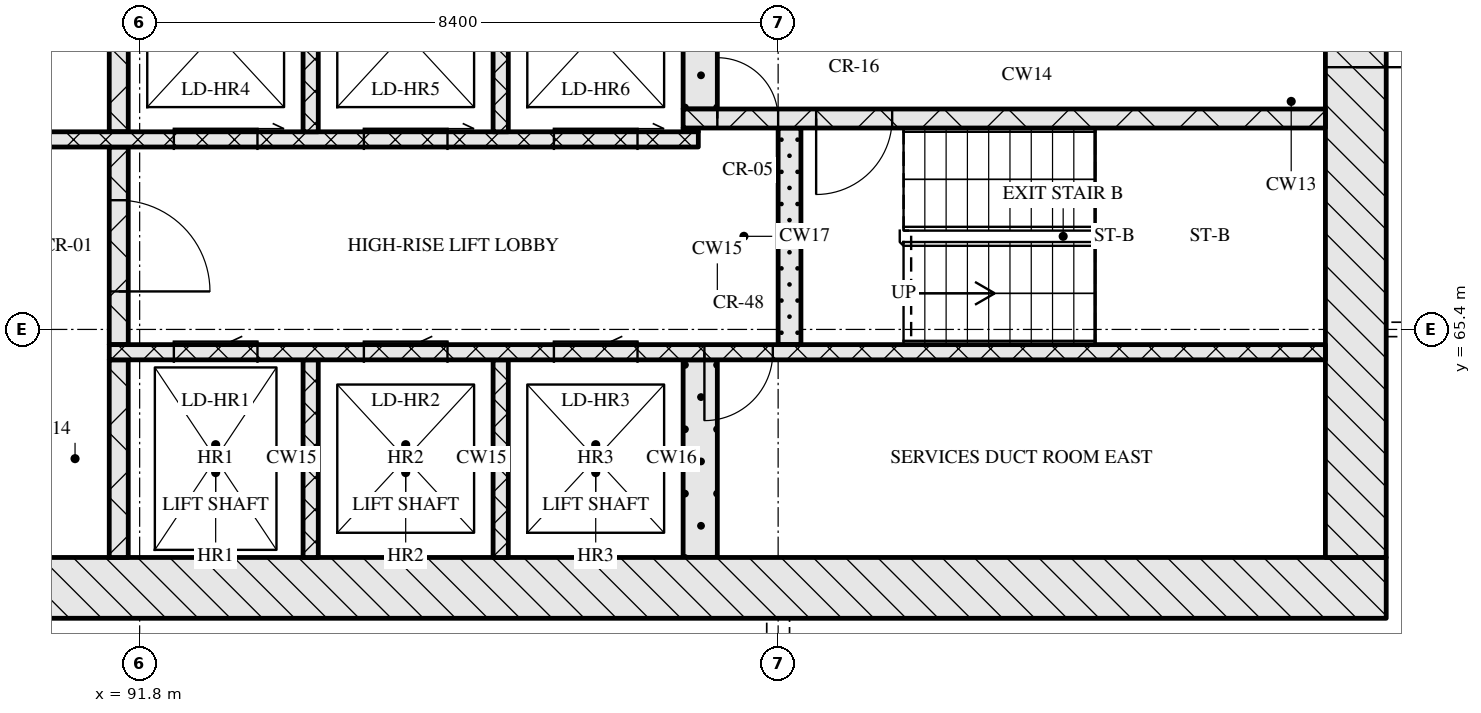
"""IFC4 building model, lengths in metres.
Left out: names, types, materials, properties, quantities, classifications, styles, units other than length and angle.
Written with IfcOpenShell. Run it as: python <this file> out.ifc"""

import sys

from ifc_helpers import new_model, si_unit, direction, frame, frame_2d, origin, place, context, subcontext, project, spatial, rectangle, extrude, element, fill, save


model = new_model("IFC4")
c1 = context("Model", 3, precision=1e-05, world=origin(), true_north=direction((0.0, 1.0)))
c2 = subcontext(c1, "Body", "Model", "MODEL_VIEW")
j1 = project(units=[si_unit("LENGTHUNIT", "METRE"), si_unit("PLANEANGLEUNIT", "RADIAN")], contexts=[c1])
p1 = place(None, origin())
s1 = spatial("IfcSite", under=j1, at=p1, CompositionType="ELEMENT")
p2 = place(p1, origin())
s2 = spatial("IfcBuilding", under=s1, at=p2, CompositionType="ELEMENT")
p3 = place(p2, frame((0.0, 0.0, 172.65)))
s3 = spatial("IfcBuildingStorey", under=s2, at=p3, CompositionType="ELEMENT", Elevation=172.65)
p4 = place(p3, frame((67.0, 62.0, 0.0), z_axis=(0.0, 0.0, 1.0), x_axis=(1.0, 0.0, 0.0)))
e1 = element("IfcWall", 1, at=p4, inside=s3, PredefinedType="SOLIDWALL", context=c2, shape_type="SweptSolid", body=[
    extrude(rectangle(XDim=41.2, YDim=0.8, at=frame_2d((20.6, 0.0))), origin(), (0.0, 0.0, 1.0), 3.32),
])
p5 = place(p4, frame((20.95, 0.0, 0.0)))
e2 = element("IfcOpeningElement", 2, at=p5, cuts=e1, PredefinedType="OPENING", context=c2, shape_type="SweptSolid", body=[
    extrude(rectangle(XDim=1.8, YDim=2.1, at=frame_2d((0.9, 1.05))), frame((0.0, 0.41, 0.0), z_axis=(0.0, -1.0, 0.0), x_axis=(1.0, 0.0, 0.0)), (0.0, 0.0, 1.0), 0.82),
])
p6 = place(p3, frame((107.8, 62.4, 0.0), z_axis=(0.0, 0.0, 1.0), x_axis=(0.0, 1.0, 0.0)))
e3 = element("IfcWall", 3, at=p6, inside=s3, PredefinedType="SOLIDWALL", context=c2, shape_type="SweptSolid", body=[
    extrude(rectangle(XDim=12.0, YDim=0.8, at=frame_2d((6.0, 0.0))), origin(), (0.0, 0.0, 1.0), 3.32),
])
p7 = place(p6, frame((6.45, 0.0, 0.0)))
e4 = element("IfcOpeningElement", 4, at=p7, cuts=e3, PredefinedType="OPENING", context=c2, shape_type="SweptSolid", body=[
    extrude(rectangle(XDim=1.2, YDim=2.1, at=frame_2d((0.6, 1.05))), frame((0.0, 0.41, 0.0), z_axis=(0.0, -1.0, 0.0), x_axis=(1.0, 0.0, 0.0)), (0.0, 0.0, 1.0), 0.82),
])
p8 = place(p3, frame((91.525, 62.4, 0.0), z_axis=(0.0, 0.0, 1.0), x_axis=(0.0, 1.0, 0.0)))
e5 = element("IfcWall", 5, at=p8, inside=s3, PredefinedType="SOLIDWALL", context=c2, shape_type="SweptSolid", body=[
    extrude(rectangle(XDim=2.6, YDim=0.25, at=frame_2d((1.3, 0.0))), origin(), (0.0, 0.0, 1.0), 3.32),
])
for number, where, z_axis, x_axis in (
    (6, (94.05, 62.4, 0.0), (0.0, 0.0, 1.0), (0.0, 1.0, 0.0)),
    (7, (96.55, 62.4, 0.0), (0.0, 0.0, 1.0), (0.0, 1.0, 0.0)),
):
    element("IfcWall", number, at=place(p3, frame(where, z_axis=z_axis, x_axis=x_axis)), inside=s3, PredefinedType="SOLIDWALL", context=c2, shape_type="SweptSolid", body=[
        extrude(rectangle(XDim=2.6, YDim=0.2, at=frame_2d((1.3, 0.0))), origin(), (0.0, 0.0, 1.0), 3.32),
    ])
p9 = place(p3, frame((99.175, 62.4, 0.0), z_axis=(0.0, 0.0, 1.0), x_axis=(0.0, 1.0, 0.0)))
e8 = element("IfcWall", 8, at=p9, inside=s3, PredefinedType="SOLIDWALL", context=c2, shape_type="SweptSolid", body=[
    extrude(rectangle(XDim=2.6, YDim=0.45, at=frame_2d((1.3, 0.0))), origin(), (0.0, 0.0, 1.0), 3.32),
])
p10 = place(p3, frame((91.4, 65.1, 0.0), z_axis=(0.0, 0.0, 1.0), x_axis=(1.0, 0.0, 0.0)))
e9 = element("IfcWall", 9, at=p10, inside=s3, PredefinedType="SOLIDWALL", context=c2, shape_type="SweptSolid", body=[
    extrude(rectangle(XDim=16.0, YDim=0.2, at=frame_2d((8.0, 0.0))), origin(), (0.0, 0.0, 1.0), 3.32),
])
p11 = place(p10, frame((0.85, 0.0, 0.0)))
e10 = element("IfcOpeningElement", 10, at=p11, cuts=e9, PredefinedType="OPENING", context=c2, shape_type="SweptSolid", body=[
    extrude(rectangle(XDim=1.1, YDim=2.1, at=frame_2d((0.55, 1.05))), frame((0.0, 0.11, 0.0), z_axis=(0.0, -1.0, 0.0), x_axis=(1.0, 0.0, 0.0)), (0.0, 0.0, 1.0), 0.22),
])
p12 = place(p10, frame((3.35, 0.0, 0.0)))
e11 = element("IfcOpeningElement", 11, at=p12, cuts=e9, PredefinedType="OPENING", context=c2, shape_type="SweptSolid", body=[
    extrude(rectangle(XDim=1.1, YDim=2.1, at=frame_2d((0.55, 1.05))), frame((0.0, 0.11, 0.0), z_axis=(0.0, -1.0, 0.0), x_axis=(1.0, 0.0, 0.0)), (0.0, 0.0, 1.0), 0.22),
])
p13 = place(p10, frame((5.85, 0.0, 0.0)))
e12 = element("IfcOpeningElement", 12, at=p13, cuts=e9, PredefinedType="OPENING", context=c2, shape_type="SweptSolid", body=[
    extrude(rectangle(XDim=1.1, YDim=2.1, at=frame_2d((0.55, 1.05))), frame((0.0, 0.11, 0.0), z_axis=(0.0, -1.0, 0.0), x_axis=(1.0, 0.0, 0.0)), (0.0, 0.0, 1.0), 0.22),
])
p14 = place(p10, frame((7.83, 0.0, 0.0)))
e13 = element("IfcOpeningElement", 13, at=p14, cuts=e9, PredefinedType="OPENING", context=c2, shape_type="SweptSolid", body=[
    extrude(rectangle(XDim=0.9, YDim=2.1, at=frame_2d((0.45, 1.05))), frame((0.0, 0.11, 0.0), z_axis=(0.0, -1.0, 0.0), x_axis=(1.0, 0.0, 0.0)), (0.0, 0.0, 1.0), 0.22),
])
p15 = place(p3, frame((91.525, 65.2, 0.0), z_axis=(0.0, 0.0, 1.0), x_axis=(0.0, 1.0, 0.0)))
e14 = element("IfcWall", 14, at=p15, inside=s3, PredefinedType="SOLIDWALL", context=c2, shape_type="SweptSolid", body=[
    extrude(rectangle(XDim=2.6, YDim=0.25, at=frame_2d((1.3, 0.0))), origin(), (0.0, 0.0, 1.0), 3.32),
])
p16 = place(p15, frame((0.7, 0.0, 0.0)))
e15 = element("IfcOpeningElement", 15, at=p16, cuts=e14, PredefinedType="OPENING", context=c2, shape_type="SweptSolid", body=[
    extrude(rectangle(XDim=1.2, YDim=2.1, at=frame_2d((0.6, 1.05))), frame((0.0, 0.135, 0.0), z_axis=(0.0, -1.0, 0.0), x_axis=(1.0, 0.0, 0.0)), (0.0, 0.0, 1.0), 0.27),
])
p17 = place(p3, frame((100.35, 65.2, 0.0), z_axis=(0.0, 0.0, 1.0), x_axis=(0.0, 1.0, 0.0)))
e16 = element("IfcWall", 16, at=p17, inside=s3, PredefinedType="SOLIDWALL", context=c2, shape_type="SweptSolid", body=[
    extrude(rectangle(XDim=2.85, YDim=0.3, at=frame_2d((1.425, 0.0))), origin(), (0.0, 0.0, 1.0), 3.32),
])
p18 = place(p3, frame((76.05, 67.9, 0.0), z_axis=(0.0, 0.0, 1.0), x_axis=(1.0, 0.0, 0.0)))
e17 = element("IfcWall", 17, at=p18, inside=s3, PredefinedType="SOLIDWALL", context=c2, shape_type="SweptSolid", body=[
    extrude(rectangle(XDim=23.1, YDim=0.2, at=frame_2d((11.55, 0.0))), origin(), (0.0, 0.0, 1.0), 3.32),
])
p19 = place(p18, frame((1.35, 0.0, 0.0)))
e18 = element("IfcOpeningElement", 18, at=p19, cuts=e17, PredefinedType="OPENING", context=c2, shape_type="SweptSolid", body=[
    extrude(rectangle(XDim=0.9, YDim=2.1, at=frame_2d((0.45, 1.05))), frame((0.0, 0.11, 0.0), z_axis=(0.0, -1.0, 0.0), x_axis=(1.0, 0.0, 0.0)), (0.0, 0.0, 1.0), 0.22),
])
p20 = place(p18, frame((5.06, 0.0, 0.0)))
e19 = element("IfcOpeningElement", 19, at=p20, cuts=e17, PredefinedType="OPENING", context=c2, shape_type="SweptSolid", body=[
    extrude(rectangle(XDim=0.9, YDim=2.1, at=frame_2d((0.45, 1.05))), frame((0.0, 0.11, 0.0), z_axis=(0.0, -1.0, 0.0), x_axis=(1.0, 0.0, 0.0)), (0.0, 0.0, 1.0), 0.22),
])
p21 = place(p18, frame((8.45, 0.0, 0.0)))
e20 = element("IfcOpeningElement", 20, at=p21, cuts=e17, PredefinedType="OPENING", context=c2, shape_type="SweptSolid", body=[
    extrude(rectangle(XDim=0.9, YDim=2.1, at=frame_2d((0.45, 1.05))), frame((0.0, 0.11, 0.0), z_axis=(0.0, -1.0, 0.0), x_axis=(1.0, 0.0, 0.0)), (0.0, 0.0, 1.0), 0.22),
])
p22 = place(p18, frame((10.91, 0.0, 0.0)))
e21 = element("IfcOpeningElement", 21, at=p22, cuts=e17, PredefinedType="OPENING", context=c2, shape_type="SweptSolid", body=[
    extrude(rectangle(XDim=0.9, YDim=2.1, at=frame_2d((0.45, 1.05))), frame((0.0, 0.11, 0.0), z_axis=(0.0, -1.0, 0.0), x_axis=(1.0, 0.0, 0.0)), (0.0, 0.0, 1.0), 0.22),
])
p23 = place(p18, frame((13.55, 0.0, 0.0)))
e22 = element("IfcOpeningElement", 22, at=p23, cuts=e17, PredefinedType="OPENING", context=c2, shape_type="SweptSolid", body=[
    extrude(rectangle(XDim=1.0, YDim=2.1, at=frame_2d((0.5, 1.05))), frame((0.0, 0.11, 0.0), z_axis=(0.0, -1.0, 0.0), x_axis=(1.0, 0.0, 0.0)), (0.0, 0.0, 1.0), 0.22),
])
p24 = place(p18, frame((16.2, 0.0, 0.0)))
e23 = element("IfcOpeningElement", 23, at=p24, cuts=e17, PredefinedType="OPENING", context=c2, shape_type="SweptSolid", body=[
    extrude(rectangle(XDim=1.1, YDim=2.1, at=frame_2d((0.55, 1.05))), frame((0.0, 0.11, 0.0), z_axis=(0.0, -1.0, 0.0), x_axis=(1.0, 0.0, 0.0)), (0.0, 0.0, 1.0), 0.22),
])
p25 = place(p18, frame((18.7, 0.0, 0.0)))
e24 = element("IfcOpeningElement", 24, at=p25, cuts=e17, PredefinedType="OPENING", context=c2, shape_type="SweptSolid", body=[
    extrude(rectangle(XDim=1.1, YDim=2.1, at=frame_2d((0.55, 1.05))), frame((0.0, 0.11, 0.0), z_axis=(0.0, -1.0, 0.0), x_axis=(1.0, 0.0, 0.0)), (0.0, 0.0, 1.0), 0.22),
])
p26 = place(p18, frame((21.2, 0.0, 0.0)))
e25 = element("IfcOpeningElement", 25, at=p26, cuts=e17, PredefinedType="OPENING", context=c2, shape_type="SweptSolid", body=[
    extrude(rectangle(XDim=1.1, YDim=2.1, at=frame_2d((0.55, 1.05))), frame((0.0, 0.11, 0.0), z_axis=(0.0, -1.0, 0.0), x_axis=(1.0, 0.0, 0.0)), (0.0, 0.0, 1.0), 0.22),
])
p27 = place(p3, frame((91.525, 68.0, 0.0), z_axis=(0.0, 0.0, 1.0), x_axis=(0.0, 1.0, 0.0)))
e26 = element("IfcWall", 26, at=p27, inside=s3, PredefinedType="SOLIDWALL", context=c2, shape_type="SweptSolid", body=[
    extrude(rectangle(XDim=2.6, YDim=0.25, at=frame_2d((1.3, 0.0))), origin(), (0.0, 0.0, 1.0), 3.32),
])
for number, where, z_axis, x_axis in (
    (27, (94.05, 68.0, 0.0), (0.0, 0.0, 1.0), (0.0, 1.0, 0.0)),
    (28, (96.55, 68.0, 0.0), (0.0, 0.0, 1.0), (0.0, 1.0, 0.0)),
):
    element("IfcWall", number, at=place(p3, frame(where, z_axis=z_axis, x_axis=x_axis)), inside=s3, PredefinedType="SOLIDWALL", context=c2, shape_type="SweptSolid", body=[
        extrude(rectangle(XDim=2.6, YDim=0.2, at=frame_2d((1.3, 0.0))), origin(), (0.0, 0.0, 1.0), 3.32),
    ])
p28 = place(p3, frame((98.95, 68.025, 0.0), z_axis=(0.0, 0.0, 1.0), x_axis=(1.0, 0.0, 0.0)))
e29 = element("IfcWall", 29, at=p28, inside=s3, PredefinedType="SOLIDWALL", context=c2, shape_type="SweptSolid", body=[
    extrude(rectangle(XDim=0.2, YDim=0.05, at=frame_2d((0.1, 0.0))), origin(), (0.0, 0.0, 1.0), 3.32),
])
p29 = place(p3, frame((98.95, 68.175, 0.0), z_axis=(0.0, 0.0, 1.0), x_axis=(1.0, 0.0, 0.0)))
e30 = element("IfcWall", 30, at=p29, inside=s3, PredefinedType="SOLIDWALL", context=c2, shape_type="SweptSolid", body=[
    extrude(rectangle(XDim=8.45, YDim=0.25, at=frame_2d((4.225, 0.0))), origin(), (0.0, 0.0, 1.0), 3.32),
])
p30 = place(p29, frame((0.45, 0.0, 0.0)))
e31 = element("IfcOpeningElement", 31, at=p30, cuts=e30, PredefinedType="OPENING", context=c2, shape_type="SweptSolid", body=[
    extrude(rectangle(XDim=0.8, YDim=2.1, at=frame_2d((0.4, 1.05))), frame((0.0, 0.135, 0.0), z_axis=(0.0, -1.0, 0.0), x_axis=(1.0, 0.0, 0.0)), (0.0, 0.0, 1.0), 0.27),
])
p31 = place(p29, frame((1.75, 0.0, 0.0)))
e32 = element("IfcOpeningElement", 32, at=p31, cuts=e30, PredefinedType="OPENING", context=c2, shape_type="SweptSolid", body=[
    extrude(rectangle(XDim=1.0, YDim=2.1, at=frame_2d((0.5, 1.05))), frame((0.0, 0.135, 0.0), z_axis=(0.0, -1.0, 0.0), x_axis=(1.0, 0.0, 0.0)), (0.0, 0.0, 1.0), 0.27),
])
p32 = place(p3, frame((99.175, 68.3, 0.0), z_axis=(0.0, 0.0, 1.0), x_axis=(0.0, 1.0, 0.0)))
e33 = element("IfcWall", 33, at=p32, inside=s3, PredefinedType="SOLIDWALL", context=c2, shape_type="SweptSolid", body=[
    extrude(rectangle(XDim=2.3, YDim=0.45, at=frame_2d((1.15, 0.0))), origin(), (0.0, 0.0, 1.0), 3.32),
])
p33 = place(p11, origin())
e34 = element("IfcDoor", 34, at=p33, inside=s3, OperationType="SLIDING_TO_LEFT", PredefinedType="DOOR", context=c2, shape_type="SweptSolid", body=[
    extrude(rectangle(XDim=1.1, YDim=2.1, at=frame_2d((0.55, 1.05))), frame((0.0, 0.025, 0.0), z_axis=(0.0, -1.0, 0.0), x_axis=(1.0, 0.0, 0.0)), (0.0, 0.0, 1.0), 0.05),
])
fill(e10, e34)
p34 = place(p12, origin())
e35 = element("IfcDoor", 35, at=p34, inside=s3, OperationType="SLIDING_TO_LEFT", PredefinedType="DOOR", context=c2, shape_type="SweptSolid", body=[
    extrude(rectangle(XDim=1.1, YDim=2.1, at=frame_2d((0.55, 1.05))), frame((0.0, 0.025, 0.0), z_axis=(0.0, -1.0, 0.0), x_axis=(1.0, 0.0, 0.0)), (0.0, 0.0, 1.0), 0.05),
])
fill(e11, e35)
p35 = place(p13, origin())
e36 = element("IfcDoor", 36, at=p35, inside=s3, OperationType="SLIDING_TO_LEFT", PredefinedType="DOOR", context=c2, shape_type="SweptSolid", body=[
    extrude(rectangle(XDim=1.1, YDim=2.1, at=frame_2d((0.55, 1.05))), frame((0.0, 0.025, 0.0), z_axis=(0.0, -1.0, 0.0), x_axis=(1.0, 0.0, 0.0)), (0.0, 0.0, 1.0), 0.05),
])
fill(e12, e36)
p36 = place(p14, origin())
e37 = element("IfcDoor", 37, at=p36, inside=s3, OperationType="SINGLE_SWING_RIGHT", PredefinedType="DOOR", context=c2, shape_type="SweptSolid", body=[
    extrude(rectangle(XDim=0.9, YDim=2.1, at=frame_2d((0.45, 1.05))), frame((0.0, 0.025, 0.0), z_axis=(0.0, -1.0, 0.0), x_axis=(1.0, 0.0, 0.0)), (0.0, 0.0, 1.0), 0.05),
])
fill(e13, e37)
p37 = place(p16, origin())
e38 = element("IfcDoor", 38, at=p37, inside=s3, OperationType="SINGLE_SWING_RIGHT", PredefinedType="DOOR", context=c2, shape_type="SweptSolid", body=[
    extrude(rectangle(XDim=1.2, YDim=2.1, at=frame_2d((0.6, 1.05))), frame((0.0, 0.025, 0.0), z_axis=(0.0, -1.0, 0.0), x_axis=(1.0, 0.0, 0.0)), (0.0, 0.0, 1.0), 0.05),
])
fill(e15, e38)
p38 = place(p24, origin())
e39 = element("IfcDoor", 39, at=p38, inside=s3, OperationType="SLIDING_TO_RIGHT", PredefinedType="DOOR", context=c2, shape_type="SweptSolid", body=[
    extrude(rectangle(XDim=1.1, YDim=2.1, at=frame_2d((0.55, 1.05))), frame((0.0, 0.025, 0.0), z_axis=(0.0, -1.0, 0.0), x_axis=(1.0, 0.0, 0.0)), (0.0, 0.0, 1.0), 0.05),
])
fill(e23, e39)
p39 = place(p25, origin())
e40 = element("IfcDoor", 40, at=p39, inside=s3, OperationType="SLIDING_TO_RIGHT", PredefinedType="DOOR", context=c2, shape_type="SweptSolid", body=[
    extrude(rectangle(XDim=1.1, YDim=2.1, at=frame_2d((0.55, 1.05))), frame((0.0, 0.025, 0.0), z_axis=(0.0, -1.0, 0.0), x_axis=(1.0, 0.0, 0.0)), (0.0, 0.0, 1.0), 0.05),
])
fill(e24, e40)
p40 = place(p26, origin())
e41 = element("IfcDoor", 41, at=p40, inside=s3, OperationType="SLIDING_TO_RIGHT", PredefinedType="DOOR", context=c2, shape_type="SweptSolid", body=[
    extrude(rectangle(XDim=1.1, YDim=2.1, at=frame_2d((0.55, 1.05))), frame((0.0, 0.025, 0.0), z_axis=(0.0, -1.0, 0.0), x_axis=(1.0, 0.0, 0.0)), (0.0, 0.0, 1.0), 0.05),
])
fill(e25, e41)
p41 = place(p30, origin())
e42 = element("IfcDoor", 42, at=p41, inside=s3, OperationType="SINGLE_SWING_LEFT", PredefinedType="DOOR", context=c2, shape_type="SweptSolid", body=[
    extrude(rectangle(XDim=0.8, YDim=2.1, at=frame_2d((0.4, 1.05))), frame((0.0, 0.025, 0.0), z_axis=(0.0, -1.0, 0.0), x_axis=(1.0, 0.0, 0.0)), (0.0, 0.0, 1.0), 0.05),
])
fill(e31, e42)
p42 = place(p31, origin())
e43 = element("IfcDoor", 43, at=p42, inside=s3, OperationType="SINGLE_SWING_RIGHT", PredefinedType="DOOR", context=c2, shape_type="SweptSolid", body=[
    extrude(rectangle(XDim=1.0, YDim=2.1, at=frame_2d((0.5, 1.05))), frame((0.0, 0.025, 0.0), z_axis=(0.0, -1.0, 0.0), x_axis=(1.0, 0.0, 0.0)), (0.0, 0.0, 1.0), 0.05),
])
fill(e32, e43)
p43 = place(p7, origin())
e44 = element("IfcDoor", 44, at=p43, inside=s3, OperationType="SINGLE_SWING_RIGHT", PredefinedType="DOOR", context=c2, shape_type="SweptSolid", body=[
    extrude(rectangle(XDim=1.2, YDim=2.1, at=frame_2d((0.6, 1.05))), frame((0.0, 0.025, 0.0), z_axis=(0.0, -1.0, 0.0), x_axis=(1.0, 0.0, 0.0)), (0.0, 0.0, 1.0), 0.05),
])
fill(e4, e44)
save(model, sys.argv[1])
